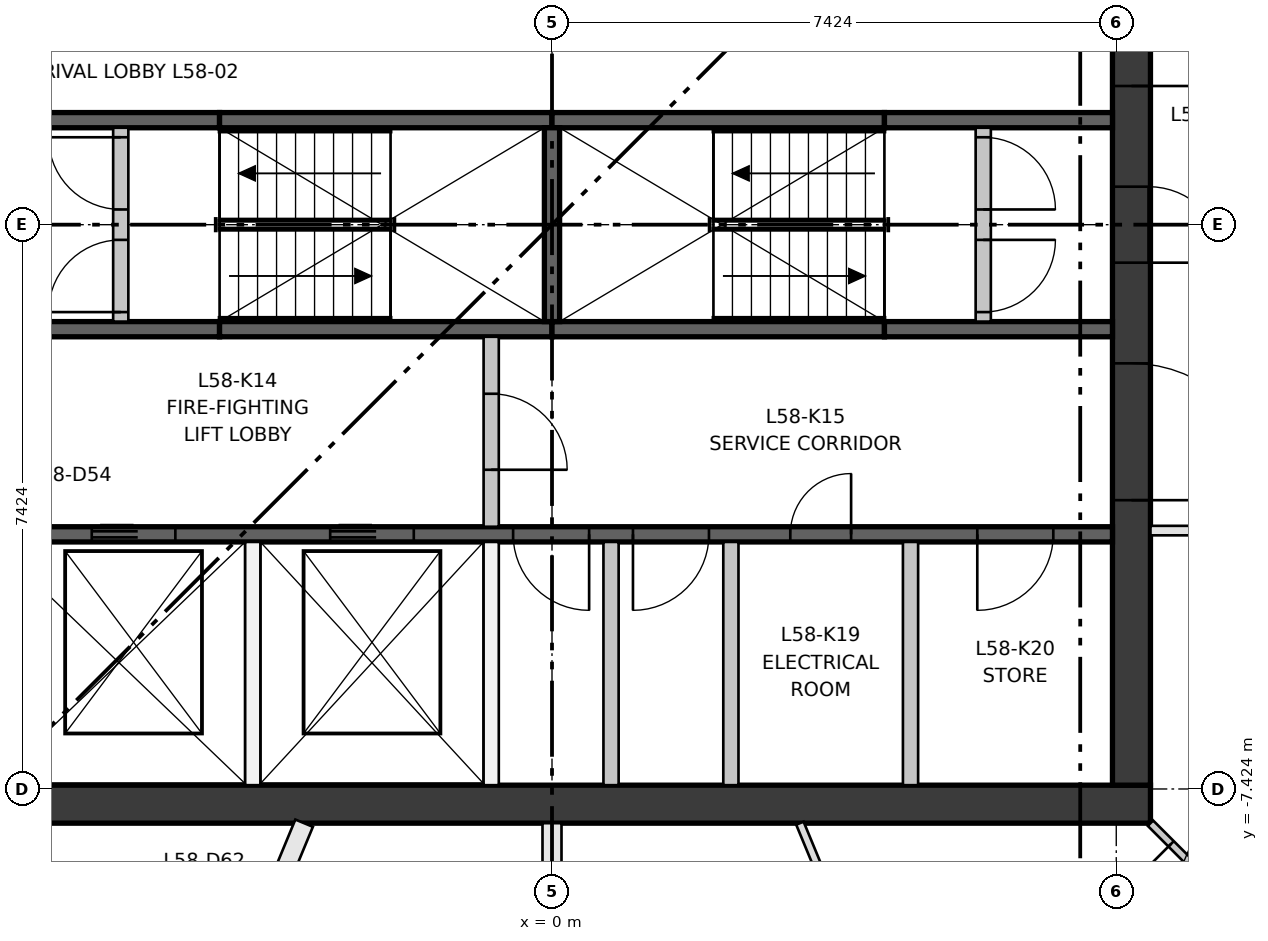
"""IFC4 building model, lengths in metres.
Left out: names, types, materials, properties, quantities, classifications, styles, units other than length and angle.
Written with IfcOpenShell. Run it as: python <this file> out.ifc"""

import sys

from ifc_helpers import new_model, si_unit, direction, frame, frame_2d, origin, place, context, subcontext, project, spatial, rectangle, extrude, element, fill, save


model = new_model("IFC4")
c1 = context("Model", 3, precision=1e-05, world=origin(), true_north=direction((0.0, 1.0)))
c2 = subcontext(c1, "Body", "Model", "MODEL_VIEW")
j1 = project(units=[si_unit("LENGTHUNIT", "METRE"), si_unit("PLANEANGLEUNIT", "RADIAN")], contexts=[c1])
p1 = place(None, origin())
s1 = spatial("IfcSite", under=j1, at=p1, CompositionType="ELEMENT")
p2 = place(p1, origin())
s2 = spatial("IfcBuilding", under=s1, at=p2, CompositionType="ELEMENT")
p3 = place(p2, frame((0.0, 0.0, 214.45)))
s3 = spatial("IfcBuildingStorey", under=s2, at=p3, CompositionType="ELEMENT", Elevation=214.45)
p4 = place(p3, frame((-7.874, -7.624, 0.0), z_axis=(0.0, 0.0, 1.0), x_axis=(1.0, 0.0, 0.0)))
e1 = element("IfcWall", 1, at=p4, inside=s3, PredefinedType="SHEAR", context=c2, shape_type="SweptSolid", body=[
    extrude(rectangle(XDim=15.748, YDim=0.5, at=frame_2d((7.874, 0.0))), origin(), (0.0, 0.0, 1.0), 3.35),
])
p5 = place(p3, frame((7.624, -7.374, 0.0), z_axis=(0.0, 0.0, 1.0), x_axis=(0.0, 1.0, 0.0)))
e2 = element("IfcWall", 2, at=p5, inside=s3, PredefinedType="SHEAR", context=c2, shape_type="SweptSolid", body=[
    extrude(rectangle(XDim=14.748, YDim=0.5, at=frame_2d((7.374, 0.0))), origin(), (0.0, 0.0, 1.0), 3.35),
])
p6 = place(p5, frame((6.874, 0.0, 0.0)))
e3 = element("IfcOpeningElement", 3, at=p6, cuts=e2, PredefinedType="OPENING", context=c2, shape_type="SweptSolid", body=[
    extrude(rectangle(XDim=1.0, YDim=2.1, at=frame_2d((0.5, 1.05))), frame((0.0, 0.26, 0.0), z_axis=(0.0, -1.0, 0.0), x_axis=(1.0, 0.0, 0.0)), (0.0, 0.0, 1.0), 0.52),
])
p7 = place(p5, frame((3.75, 0.0, 0.0)))
e4 = element("IfcOpeningElement", 4, at=p7, cuts=e2, PredefinedType="OPENING", context=c2, shape_type="SweptSolid", body=[
    extrude(rectangle(XDim=1.8, YDim=2.1, at=frame_2d((0.9, 1.05))), frame((0.0, 0.26, 0.0), z_axis=(0.0, -1.0, 0.0), x_axis=(1.0, 0.0, 0.0)), (0.0, 0.0, 1.0), 0.52),
])
p8 = place(p5, frame((9.198, 0.0, 0.0)))
e5 = element("IfcOpeningElement", 5, at=p8, cuts=e2, PredefinedType="OPENING", context=c2, shape_type="SweptSolid", body=[
    extrude(rectangle(XDim=1.8, YDim=2.1, at=frame_2d((0.9, 1.05))), frame((0.0, 0.26, 0.0), z_axis=(0.0, -1.0, 0.0), x_axis=(1.0, 0.0, 0.0)), (0.0, 0.0, 1.0), 0.52),
])
p9 = place(p3, frame((-7.374, -4.074, 0.0), z_axis=(0.0, 0.0, 1.0), x_axis=(1.0, 0.0, 0.0)))
e6 = element("IfcWall", 6, at=p9, inside=s3, PredefinedType="SHEAR", context=c2, shape_type="SweptSolid", body=[
    extrude(rectangle(XDim=14.748, YDim=0.2, at=frame_2d((7.374, 0.0))), origin(), (0.0, 0.0, 1.0), 3.0),
])
p10 = place(p9, frame((1.319, 0.0, 0.0)))
e7 = element("IfcOpeningElement", 7, at=p10, cuts=e6, PredefinedType="OPENING", context=c2, shape_type="SweptSolid", body=[
    extrude(rectangle(XDim=1.1, YDim=2.1, at=frame_2d((0.55, 1.05))), frame((0.0, 0.11, 0.0), z_axis=(0.0, -1.0, 0.0), x_axis=(1.0, 0.0, 0.0)), (0.0, 0.0, 1.0), 0.22),
])
p11 = place(p9, frame((4.456, 0.0, 0.0)))
e8 = element("IfcOpeningElement", 8, at=p11, cuts=e6, PredefinedType="OPENING", context=c2, shape_type="SweptSolid", body=[
    extrude(rectangle(XDim=1.1, YDim=2.1, at=frame_2d((0.55, 1.05))), frame((0.0, 0.11, 0.0), z_axis=(0.0, -1.0, 0.0), x_axis=(1.0, 0.0, 0.0)), (0.0, 0.0, 1.0), 0.22),
])
p12 = place(p9, frame((6.862, 0.0, 0.0)))
e9 = element("IfcOpeningElement", 9, at=p12, cuts=e6, PredefinedType="OPENING", context=c2, shape_type="SweptSolid", body=[
    extrude(rectangle(XDim=1.0, YDim=2.1, at=frame_2d((0.5, 1.05))), frame((0.0, 0.11, 0.0), z_axis=(0.0, -1.0, 0.0), x_axis=(1.0, 0.0, 0.0)), (0.0, 0.0, 1.0), 0.22),
])
p13 = place(p9, frame((8.439, 0.0, 0.0)))
e10 = element("IfcOpeningElement", 10, at=p13, cuts=e6, PredefinedType="OPENING", context=c2, shape_type="SweptSolid", body=[
    extrude(rectangle(XDim=1.0, YDim=2.1, at=frame_2d((0.5, 1.05))), frame((0.0, 0.11, 0.0), z_axis=(0.0, -1.0, 0.0), x_axis=(1.0, 0.0, 0.0)), (0.0, 0.0, 1.0), 0.22),
])
p14 = place(p9, frame((10.509, 0.0, 0.0)))
e11 = element("IfcOpeningElement", 11, at=p14, cuts=e6, PredefinedType="OPENING", context=c2, shape_type="SweptSolid", body=[
    extrude(rectangle(XDim=0.8, YDim=2.1, at=frame_2d((0.4, 1.05))), frame((0.0, 0.11, 0.0), z_axis=(0.0, -1.0, 0.0), x_axis=(1.0, 0.0, 0.0)), (0.0, 0.0, 1.0), 0.22),
])
p15 = place(p9, frame((12.969, 0.0, 0.0)))
e12 = element("IfcOpeningElement", 12, at=p15, cuts=e6, PredefinedType="OPENING", context=c2, shape_type="SweptSolid", body=[
    extrude(rectangle(XDim=1.0, YDim=2.1, at=frame_2d((0.5, 1.05))), frame((0.0, 0.11, 0.0), z_axis=(0.0, -1.0, 0.0), x_axis=(1.0, 0.0, 0.0)), (0.0, 0.0, 1.0), 0.22),
])
p16 = place(p3, frame((-7.374, -1.375, 0.0), z_axis=(0.0, 0.0, 1.0), x_axis=(1.0, 0.0, 0.0)))
e13 = element("IfcWall", 13, at=p16, inside=s3, PredefinedType="SHEAR", context=c2, shape_type="SweptSolid", body=[
    extrude(rectangle(XDim=3.0, YDim=0.2, at=frame_2d((1.5, 0.0))), origin(), (0.0, 0.0, 1.0), 3.0),
])
for number, where, z_axis, x_axis in (
    (14, (-4.374, -1.375, 0.0), (0.0, 0.0, 1.0), (1.0, 0.0, 0.0)),
    (15, (0.0, -1.375, 0.0), (0.0, 0.0, 1.0), (1.0, 0.0, 0.0)),
):
    element("IfcWall", number, at=place(p3, frame(where, z_axis=z_axis, x_axis=x_axis)), inside=s3, PredefinedType="SHEAR", context=c2, shape_type="SweptSolid", body=[
        extrude(rectangle(XDim=4.374, YDim=0.2, at=frame_2d((2.187, 0.0))), origin(), (0.0, 0.0, 1.0), 3.0),
    ])
for number, where, z_axis, x_axis in (
    (16, (4.374, -1.375, 0.0), (0.0, 0.0, 1.0), (1.0, 0.0, 0.0)),
    (17, (-7.374, 1.375, 0.0), (0.0, 0.0, 1.0), (1.0, 0.0, 0.0)),
):
    element("IfcWall", number, at=place(p3, frame(where, z_axis=z_axis, x_axis=x_axis)), inside=s3, PredefinedType="SHEAR", context=c2, shape_type="SweptSolid", body=[
        extrude(rectangle(XDim=3.0, YDim=0.2, at=frame_2d((1.5, 0.0))), origin(), (0.0, 0.0, 1.0), 3.0),
    ])
for number, where, z_axis, x_axis in (
    (18, (-4.374, 1.375, 0.0), (0.0, 0.0, 1.0), (1.0, 0.0, 0.0)),
    (19, (0.0, 1.375, 0.0), (0.0, 0.0, 1.0), (1.0, 0.0, 0.0)),
):
    element("IfcWall", number, at=place(p3, frame(where, z_axis=z_axis, x_axis=x_axis)), inside=s3, PredefinedType="SHEAR", context=c2, shape_type="SweptSolid", body=[
        extrude(rectangle(XDim=4.374, YDim=0.2, at=frame_2d((2.187, 0.0))), origin(), (0.0, 0.0, 1.0), 3.0),
    ])
p17 = place(p3, frame((4.374, 1.375, 0.0), z_axis=(0.0, 0.0, 1.0), x_axis=(1.0, 0.0, 0.0)))
e20 = element("IfcWall", 20, at=p17, inside=s3, PredefinedType="SHEAR", context=c2, shape_type="SweptSolid", body=[
    extrude(rectangle(XDim=3.0, YDim=0.2, at=frame_2d((1.5, 0.0))), origin(), (0.0, 0.0, 1.0), 3.0),
])
p18 = place(p3, frame((0.0, -1.275, 0.0), z_axis=(0.0, 0.0, 1.0), x_axis=(0.0, 1.0, 0.0)))
e21 = element("IfcWall", 21, at=p18, inside=s3, PredefinedType="SHEAR", context=c2, shape_type="SweptSolid", body=[
    extrude(rectangle(XDim=2.55, YDim=0.2, at=frame_2d((1.275, 0.0))), origin(), (0.0, 0.0, 1.0), 3.0),
])
for number, where, z_axis, x_axis in (
    (22, (-3.937, -7.374, 0.0), (0.0, 0.0, 1.0), (0.0, 1.0, 0.0)),
    (23, (-0.8, -7.374, 0.0), (0.0, 0.0, 1.0), (0.0, 1.0, 0.0)),
):
    element("IfcWall", number, at=place(p3, frame(where, z_axis=z_axis, x_axis=x_axis)), inside=s3, PredefinedType="PARTITIONING", context=c2, shape_type="SweptSolid", body=[
        extrude(rectangle(XDim=3.2, YDim=0.2, at=frame_2d((1.6, 0.0))), origin(), (0.0, 0.0, 1.0), 3.0),
    ])
p19 = place(p3, frame((-0.8, -3.974, 0.0), z_axis=(0.0, 0.0, 1.0), x_axis=(0.0, 1.0, 0.0)))
e24 = element("IfcWall", 24, at=p19, inside=s3, PredefinedType="PARTITIONING", context=c2, shape_type="SweptSolid", body=[
    extrude(rectangle(XDim=2.499, YDim=0.2, at=frame_2d((1.25, 0.0))), origin(), (0.0, 0.0, 1.0), 3.0),
])
p20 = place(p19, frame((0.75, 0.0, 0.0)))
e25 = element("IfcOpeningElement", 25, at=p20, cuts=e24, PredefinedType="OPENING", context=c2, shape_type="SweptSolid", body=[
    extrude(rectangle(XDim=1.0, YDim=2.1, at=frame_2d((0.5, 1.05))), frame((0.0, 0.11, 0.0), z_axis=(0.0, -1.0, 0.0), x_axis=(1.0, 0.0, 0.0)), (0.0, 0.0, 1.0), 0.22),
])
for number, where, z_axis, x_axis in (
    (26, (0.777, -7.374, 0.0), (0.0, 0.0, 1.0), (0.0, 1.0, 0.0)),
    (27, (2.354, -7.374, 0.0), (0.0, 0.0, 1.0), (0.0, 1.0, 0.0)),
    (28, (4.717, -7.374, 0.0), (0.0, 0.0, 1.0), (0.0, 1.0, 0.0)),
):
    element("IfcWall", number, at=place(p3, frame(where, z_axis=z_axis, x_axis=x_axis)), inside=s3, PredefinedType="PARTITIONING", context=c2, shape_type="SweptSolid", body=[
        extrude(rectangle(XDim=3.2, YDim=0.2, at=frame_2d((1.6, 0.0))), origin(), (0.0, 0.0, 1.0), 3.0),
    ])
p21 = place(p3, frame((-5.674, -1.275, 0.0), z_axis=(0.0, 0.0, 1.0), x_axis=(0.0, 1.0, 0.0)))
e29 = element("IfcWall", 29, at=p21, inside=s3, PredefinedType="PARTITIONING", context=c2, shape_type="SweptSolid", body=[
    extrude(rectangle(XDim=2.55, YDim=0.2, at=frame_2d((1.275, 0.0))), origin(), (0.0, 0.0, 1.0), 3.0),
])
p22 = place(p21, frame((0.125, 0.0, 0.0)))
e30 = element("IfcOpeningElement", 30, at=p22, cuts=e29, PredefinedType="OPENING", context=c2, shape_type="SweptSolid", body=[
    extrude(rectangle(XDim=0.95, YDim=2.1, at=frame_2d((0.475, 1.05))), frame((0.0, 0.11, 0.0), z_axis=(0.0, -1.0, 0.0), x_axis=(1.0, 0.0, 0.0)), (0.0, 0.0, 1.0), 0.22),
])
p23 = place(p21, frame((1.475, 0.0, 0.0)))
e31 = element("IfcOpeningElement", 31, at=p23, cuts=e29, PredefinedType="OPENING", context=c2, shape_type="SweptSolid", body=[
    extrude(rectangle(XDim=0.95, YDim=2.1, at=frame_2d((0.475, 1.05))), frame((0.0, 0.11, 0.0), z_axis=(0.0, -1.0, 0.0), x_axis=(1.0, 0.0, 0.0)), (0.0, 0.0, 1.0), 0.22),
])
p24 = place(p3, frame((5.674, -1.275, 0.0), z_axis=(0.0, 0.0, 1.0), x_axis=(0.0, 1.0, 0.0)))
e32 = element("IfcWall", 32, at=p24, inside=s3, PredefinedType="PARTITIONING", context=c2, shape_type="SweptSolid", body=[
    extrude(rectangle(XDim=2.55, YDim=0.2, at=frame_2d((1.275, 0.0))), origin(), (0.0, 0.0, 1.0), 3.0),
])
p25 = place(p24, frame((0.125, 0.0, 0.0)))
e33 = element("IfcOpeningElement", 33, at=p25, cuts=e32, PredefinedType="OPENING", context=c2, shape_type="SweptSolid", body=[
    extrude(rectangle(XDim=0.95, YDim=2.1, at=frame_2d((0.475, 1.05))), frame((0.0, 0.11, 0.0), z_axis=(0.0, -1.0, 0.0), x_axis=(1.0, 0.0, 0.0)), (0.0, 0.0, 1.0), 0.22),
])
p26 = place(p24, frame((1.475, 0.0, 0.0)))
e34 = element("IfcOpeningElement", 34, at=p26, cuts=e32, PredefinedType="OPENING", context=c2, shape_type="SweptSolid", body=[
    extrude(rectangle(XDim=0.95, YDim=2.1, at=frame_2d((0.475, 1.05))), frame((0.0, 0.11, 0.0), z_axis=(0.0, -1.0, 0.0), x_axis=(1.0, 0.0, 0.0)), (0.0, 0.0, 1.0), 0.22),
])
p27 = place(p3, frame((10.349, -4.024, 0.0), z_axis=(0.0, 0.0, 1.0), x_axis=(-1.0, 0.0, 0.0)))
e35 = element("IfcWall", 35, at=p27, inside=s3, PredefinedType="PARTITIONING", context=c2, shape_type="SweptSolid", body=[
    extrude(rectangle(XDim=2.475, YDim=0.125, at=frame_2d((1.238, 0.0))), origin(), (0.0, 0.0, 1.0), 3.0),
])
p28 = place(p27, frame((0.7, 0.0, 0.0)))
e36 = element("IfcOpeningElement", 36, at=p28, cuts=e35, PredefinedType="OPENING", context=c2, shape_type="SweptSolid", body=[
    extrude(rectangle(XDim=1.0, YDim=2.1, at=frame_2d((0.5, 1.05))), frame((0.0, 0.073, 0.0), z_axis=(0.0, -1.0, 0.0), x_axis=(1.0, 0.0, 0.0)), (0.0, 0.0, 1.0), 0.145),
])
p29 = place(p3, frame((-3.261, -7.874, 0.0), z_axis=(0.0, 0.0, 1.0), x_axis=(-0.382686527355, -0.923878250519, 0.0)))
e37 = element("IfcWall", 37, at=p29, inside=s3, PredefinedType="PARTITIONING", context=c2, shape_type="SweptSolid", body=[
    extrude(rectangle(XDim=2.877, YDim=0.25, at=frame_2d((1.438, 0.0))), origin(), (0.0, 0.0, 1.0), 3.0),
])
p30 = place(p29, frame((0.9, 0.0, 0.0)))
e38 = element("IfcOpeningElement", 38, at=p30, cuts=e37, PredefinedType="OPENING", context=c2, shape_type="SweptSolid", body=[
    extrude(rectangle(XDim=1.0, YDim=2.1, at=frame_2d((0.5, 1.05))), frame((0.0, 0.135, 0.0), z_axis=(0.0, -1.0, 0.0), x_axis=(1.0, 0.0, 0.0)), (0.0, 0.0, 1.0), 0.27),
])
p31 = place(p3, frame((0.0, -7.874, 0.0), z_axis=(0.0, 0.0, 1.0), x_axis=(0.0, -1.0, 0.0)))
e39 = element("IfcWall", 39, at=p31, inside=s3, PredefinedType="PARTITIONING", context=c2, shape_type="SweptSolid", body=[
    extrude(rectangle(XDim=3.526, YDim=0.25, at=frame_2d((1.763, 0.0))), origin(), (0.0, 0.0, 1.0), 3.0),
])
p32 = place(p3, frame((4.363, -10.532, 0.0), z_axis=(0.0, 0.0, 1.0), x_axis=(-0.382686527355, 0.923878250519, 0.0)))
e40 = element("IfcWall", 40, at=p32, inside=s3, PredefinedType="PARTITIONING", context=c2, shape_type="SweptSolid", body=[
    extrude(rectangle(XDim=2.877, YDim=0.105, at=frame_2d((1.438, 0.0))), origin(), (0.0, 0.0, 1.0), 3.0),
])
p33 = place(p32, frame((0.9, 0.0, 0.0)))
e41 = element("IfcOpeningElement", 41, at=p33, cuts=e40, PredefinedType="OPENING", context=c2, shape_type="SweptSolid", body=[
    extrude(rectangle(XDim=1.0, YDim=2.1, at=frame_2d((0.5, 1.05))), frame((0.0, 0.062, 0.0), z_axis=(0.0, -1.0, 0.0), x_axis=(1.0, 0.0, 0.0)), (0.0, 0.0, 1.0), 0.125),
])
p34 = place(p3, frame((10.409, -10.409, 0.0), z_axis=(0.0, 0.0, 1.0), x_axis=(-0.707106781187, 0.707106781187, 0.0)))
e42 = element("IfcWall", 42, at=p34, inside=s3, PredefinedType="PARTITIONING", context=c2, shape_type="SweptSolid", body=[
    extrude(rectangle(XDim=3.584, YDim=0.1, at=frame_2d((1.792, 0.0))), origin(), (0.0, 0.0, 1.0), 3.0),
])
p35 = place(p34, frame((2.2, 0.0, 0.0)))
e43 = element("IfcOpeningElement", 43, at=p35, cuts=e42, PredefinedType="OPENING", context=c2, shape_type="SweptSolid", body=[
    extrude(rectangle(XDim=1.0, YDim=2.1, at=frame_2d((0.5, 1.05))), frame((0.0, 0.06, 0.0), z_axis=(0.0, -1.0, 0.0), x_axis=(1.0, 0.0, 0.0)), (0.0, 0.0, 1.0), 0.12),
])
p36 = place(p10, origin())
e44 = element("IfcDoor", 44, at=p36, inside=s3, OperationType="DOUBLE_DOOR_SLIDING", PredefinedType="DOOR", context=c2, shape_type="SweptSolid", body=[
    extrude(rectangle(XDim=1.1, YDim=2.1, at=frame_2d((0.55, 1.05))), frame((0.0, 0.025, 0.0), z_axis=(0.0, -1.0, 0.0), x_axis=(1.0, 0.0, 0.0)), (0.0, 0.0, 1.0), 0.05),
])
fill(e7, e44)
p37 = place(p11, origin())
e45 = element("IfcDoor", 45, at=p37, inside=s3, OperationType="DOUBLE_DOOR_SLIDING", PredefinedType="DOOR", context=c2, shape_type="SweptSolid", body=[
    extrude(rectangle(XDim=1.1, YDim=2.1, at=frame_2d((0.55, 1.05))), frame((0.0, 0.025, 0.0), z_axis=(0.0, -1.0, 0.0), x_axis=(1.0, 0.0, 0.0)), (0.0, 0.0, 1.0), 0.05),
])
fill(e8, e45)
p38 = place(p22, origin())
e46 = element("IfcDoor", 46, at=p38, inside=s3, OperationType="SINGLE_SWING_LEFT", PredefinedType="DOOR", context=c2, shape_type="SweptSolid", body=[
    extrude(rectangle(XDim=0.95, YDim=2.1, at=frame_2d((0.475, 1.05))), frame((0.0, 0.025, 0.0), z_axis=(0.0, -1.0, 0.0), x_axis=(1.0, 0.0, 0.0)), (0.0, 0.0, 1.0), 0.05),
])
fill(e30, e46)
p39 = place(p23, origin())
e47 = element("IfcDoor", 47, at=p39, inside=s3, OperationType="SINGLE_SWING_RIGHT", PredefinedType="DOOR", context=c2, shape_type="SweptSolid", body=[
    extrude(rectangle(XDim=0.95, YDim=2.1, at=frame_2d((0.475, 1.05))), frame((0.0, 0.025, 0.0), z_axis=(0.0, -1.0, 0.0), x_axis=(1.0, 0.0, 0.0)), (0.0, 0.0, 1.0), 0.05),
])
fill(e31, e47)
p40 = place(p25, frame((0.95, 0.0, 0.0), z_axis=(0.0, 0.0, 1.0), x_axis=(-1.0, 0.0, 0.0)))
e48 = element("IfcDoor", 48, at=p40, inside=s3, OperationType="SINGLE_SWING_RIGHT", PredefinedType="DOOR", context=c2, shape_type="SweptSolid", body=[
    extrude(rectangle(XDim=0.95, YDim=2.1, at=frame_2d((0.475, 1.05))), frame((0.0, 0.025, 0.0), z_axis=(0.0, -1.0, 0.0), x_axis=(1.0, 0.0, 0.0)), (0.0, 0.0, 1.0), 0.05),
])
fill(e33, e48)
p41 = place(p26, frame((0.95, 0.0, 0.0), z_axis=(0.0, 0.0, 1.0), x_axis=(-1.0, 0.0, 0.0)))
e49 = element("IfcDoor", 49, at=p41, inside=s3, OperationType="SINGLE_SWING_LEFT", PredefinedType="DOOR", context=c2, shape_type="SweptSolid", body=[
    extrude(rectangle(XDim=0.95, YDim=2.1, at=frame_2d((0.475, 1.05))), frame((0.0, 0.025, 0.0), z_axis=(0.0, -1.0, 0.0), x_axis=(1.0, 0.0, 0.0)), (0.0, 0.0, 1.0), 0.05),
])
fill(e34, e49)
p42 = place(p20, frame((1.0, 0.0, 0.0), z_axis=(0.0, 0.0, 1.0), x_axis=(-1.0, 0.0, 0.0)))
e50 = element("IfcDoor", 50, at=p42, inside=s3, OperationType="SINGLE_SWING_LEFT", PredefinedType="DOOR", context=c2, shape_type="SweptSolid", body=[
    extrude(rectangle(XDim=1.0, YDim=2.1, at=frame_2d((0.5, 1.05))), frame((0.0, 0.025, 0.0), z_axis=(0.0, -1.0, 0.0), x_axis=(1.0, 0.0, 0.0)), (0.0, 0.0, 1.0), 0.05),
])
fill(e25, e50)
p43 = place(p12, frame((1.0, 0.0, 0.0), z_axis=(0.0, 0.0, 1.0), x_axis=(-1.0, 0.0, 0.0)))
e51 = element("IfcDoor", 51, at=p43, inside=s3, OperationType="SINGLE_SWING_RIGHT", PredefinedType="DOOR", context=c2, shape_type="SweptSolid", body=[
    extrude(rectangle(XDim=1.0, YDim=2.1, at=frame_2d((0.5, 1.05))), frame((0.0, 0.025, 0.0), z_axis=(0.0, -1.0, 0.0), x_axis=(1.0, 0.0, 0.0)), (0.0, 0.0, 1.0), 0.05),
])
fill(e9, e51)
p44 = place(p13, frame((1.0, 0.0, 0.0), z_axis=(0.0, 0.0, 1.0), x_axis=(-1.0, 0.0, 0.0)))
e52 = element("IfcDoor", 52, at=p44, inside=s3, OperationType="SINGLE_SWING_LEFT", PredefinedType="DOOR", context=c2, shape_type="SweptSolid", body=[
    extrude(rectangle(XDim=1.0, YDim=2.1, at=frame_2d((0.5, 1.05))), frame((0.0, 0.025, 0.0), z_axis=(0.0, -1.0, 0.0), x_axis=(1.0, 0.0, 0.0)), (0.0, 0.0, 1.0), 0.05),
])
fill(e10, e52)
p45 = place(p14, origin())
e53 = element("IfcDoor", 53, at=p45, inside=s3, OperationType="SINGLE_SWING_RIGHT", PredefinedType="DOOR", context=c2, shape_type="SweptSolid", body=[
    extrude(rectangle(XDim=0.8, YDim=2.1, at=frame_2d((0.4, 1.05))), frame((0.0, 0.025, 0.0), z_axis=(0.0, -1.0, 0.0), x_axis=(1.0, 0.0, 0.0)), (0.0, 0.0, 1.0), 0.05),
])
fill(e11, e53)
p46 = place(p15, frame((1.0, 0.0, 0.0), z_axis=(0.0, 0.0, 1.0), x_axis=(-1.0, 0.0, 0.0)))
e54 = element("IfcDoor", 54, at=p46, inside=s3, OperationType="SINGLE_SWING_LEFT", PredefinedType="DOOR", context=c2, shape_type="SweptSolid", body=[
    extrude(rectangle(XDim=1.0, YDim=2.1, at=frame_2d((0.5, 1.05))), frame((0.0, 0.025, 0.0), z_axis=(0.0, -1.0, 0.0), x_axis=(1.0, 0.0, 0.0)), (0.0, 0.0, 1.0), 0.05),
])
fill(e12, e54)
p47 = place(p6, frame((1.0, 0.0, 0.0), z_axis=(0.0, 0.0, 1.0), x_axis=(-1.0, 0.0, 0.0)))
e55 = element("IfcDoor", 55, at=p47, inside=s3, OperationType="SINGLE_SWING_LEFT", PredefinedType="DOOR", context=c2, shape_type="SweptSolid", body=[
    extrude(rectangle(XDim=1.0, YDim=2.1, at=frame_2d((0.5, 1.05))), frame((0.0, 0.25, 0.0), z_axis=(0.0, -1.0, 0.0), x_axis=(1.0, 0.0, 0.0)), (0.0, 0.0, 1.0), 0.05),
])
fill(e3, e55)
p48 = place(p7, frame((1.8, 0.0, 0.0), z_axis=(0.0, 0.0, 1.0), x_axis=(-1.0, 0.0, 0.0)))
e56 = element("IfcDoor", 56, at=p48, inside=s3, OperationType="DOUBLE_DOOR_SINGLE_SWING", PredefinedType="DOOR", context=c2, shape_type="SweptSolid", body=[
    extrude(rectangle(XDim=1.8, YDim=2.1, at=frame_2d((0.9, 1.05))), frame((0.0, 0.025, 0.0), z_axis=(0.0, -1.0, 0.0), x_axis=(1.0, 0.0, 0.0)), (0.0, 0.0, 1.0), 0.05),
])
fill(e4, e56)
p49 = place(p8, frame((1.8, 0.0, 0.0), z_axis=(0.0, 0.0, 1.0), x_axis=(-1.0, 0.0, 0.0)))
e57 = element("IfcDoor", 57, at=p49, inside=s3, OperationType="DOUBLE_DOOR_SINGLE_SWING", PredefinedType="DOOR", context=c2, shape_type="SweptSolid", body=[
    extrude(rectangle(XDim=1.8, YDim=2.1, at=frame_2d((0.9, 1.05))), frame((0.0, 0.025, 0.0), z_axis=(0.0, -1.0, 0.0), x_axis=(1.0, 0.0, 0.0)), (0.0, 0.0, 1.0), 0.05),
])
fill(e5, e57)
p50 = place(p35, origin())
e58 = element("IfcDoor", 58, at=p50, inside=s3, OperationType="SINGLE_SWING_RIGHT", PredefinedType="DOOR", context=c2, shape_type="SweptSolid", body=[
    extrude(rectangle(XDim=1.0, YDim=2.1, at=frame_2d((0.5, 1.05))), frame((0.0, 0.025, 0.0), z_axis=(0.0, -1.0, 0.0), x_axis=(1.0, 0.0, 0.0)), (0.0, 0.0, 1.0), 0.05),
])
fill(e43, e58)
save(model, sys.argv[1])
